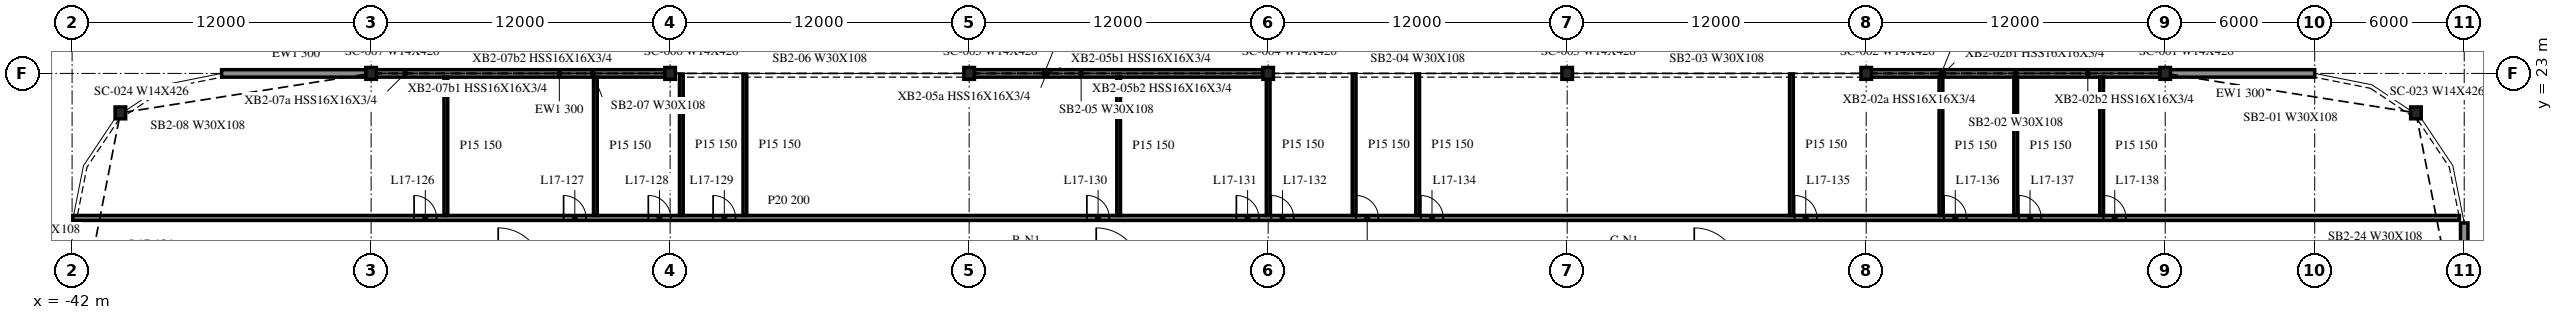
"""IFC4 building model, lengths in metres.
Left out: names, types, materials, properties, quantities, classifications, styles, units other than length and angle.
Written with IfcOpenShell. Run it as: python <this file> out.ifc"""

import sys

from ifc_helpers import new_model, si_unit, direction, frame, frame_2d, origin, origin_2d, place, context, subcontext, project, spatial, rectangle, i_section, extrude, element, fill, save


model = new_model("IFC4")
c1 = context("Model", 3, precision=1e-05, world=origin(), true_north=direction((0.0, 1.0)))
c2 = subcontext(c1, "Body", "Model", "MODEL_VIEW")
j1 = project(units=[si_unit("LENGTHUNIT", "METRE"), si_unit("PLANEANGLEUNIT", "RADIAN")], contexts=[c1])
p1 = place(None, origin())
s1 = spatial("IfcSite", under=j1, at=p1, CompositionType="ELEMENT")
p2 = place(p1, origin())
s2 = spatial("IfcBuilding", under=s1, at=p2, CompositionType="ELEMENT")
p3 = place(p2, frame((0.0, 0.0, 76.1)))
s3 = spatial("IfcBuildingStorey", under=s2, at=p3, CompositionType="ELEMENT", Elevation=76.1)
for number, where, z_axis, x_axis in (
    (1, (52.062, 21.416, -0.34), (0.0, 0.0, 1.0), (1.0, 0.0, 0.0)),
    (2, (42.0, 23.0, -0.34), (0.0, 0.0, 1.0), (1.0, 0.0, 0.0)),
    (3, (30.0, 23.0, -0.34), (0.0, 0.0, 1.0), (1.0, 0.0, 0.0)),
    (4, (18.0, 23.0, -0.34), (0.0, 0.0, 1.0), (1.0, 0.0, 0.0)),
    (5, (6.0, 23.0, -0.34), (0.0, 0.0, 1.0), (1.0, 0.0, 0.0)),
    (6, (-6.0, 23.0, -0.34), (0.0, 0.0, 1.0), (1.0, 0.0, 0.0)),
    (7, (-18.0, 23.0, -0.34), (0.0, 0.0, 1.0), (1.0, 0.0, 0.0)),
    (8, (-30.0, 23.0, -0.34), (0.0, 0.0, 1.0), (1.0, 0.0, 0.0)),
    (9, (-40.062, 21.416, -0.34), (0.0, 0.0, 1.0), (1.0, 0.0, 0.0)),
):
    element("IfcColumn", number, at=place(p3, frame(where, z_axis=z_axis, x_axis=x_axis)), inside=s3, PredefinedType="COLUMN", context=c2, shape_type="SweptSolid", body=[
        extrude(i_section(OverallWidth=0.424, OverallDepth=0.475, WebThickness=0.048, FlangeThickness=0.077, at=origin_2d()), origin(), (0.0, 0.0, 1.0), 4.09),
    ])
p4 = place(p3, frame((48.0, 23.0, 0.0), z_axis=(0.0, 0.0, 1.0), x_axis=(-1.0, 0.0, 0.0)))
e10 = element("IfcWall", 10, at=p4, inside=s3, PredefinedType="NOTDEFINED", context=c2, shape_type="SweptSolid", body=[
    extrude(rectangle(XDim=5.976, YDim=0.3, at=frame_2d((2.988, 0.0))), origin(), (0.0, 0.0, 1.0), 3.75),
])
for number, where, z_axis, x_axis in (
    (11, (41.976, 23.0, 0.0), (0.0, 0.0, 1.0), (-1.0, 0.0, 0.0)),
    (12, (5.976, 23.0, 0.0), (0.0, 0.0, 1.0), (-1.0, 0.0, 0.0)),
    (13, (-18.024, 23.0, 0.0), (0.0, 0.0, 1.0), (-1.0, 0.0, 0.0)),
):
    element("IfcWall", number, at=place(p3, frame(where, z_axis=z_axis, x_axis=x_axis)), inside=s3, PredefinedType="NOTDEFINED", context=c2, shape_type="SweptSolid", body=[
        extrude(rectangle(XDim=11.952, YDim=0.3, at=frame_2d((5.976, 0.0))), origin(), (0.0, 0.0, 1.0), 3.75),
    ])
p5 = place(p3, frame((-30.024, 23.0, 0.0), z_axis=(0.0, 0.0, 1.0), x_axis=(-1.0, 0.0, 0.0)))
e14 = element("IfcWall", 14, at=p5, inside=s3, PredefinedType="NOTDEFINED", context=c2, shape_type="SweptSolid", body=[
    extrude(rectangle(XDim=5.976, YDim=0.3, at=frame_2d((2.988, 0.0))), origin(), (0.0, 0.0, 1.0), 3.75),
])
p6 = place(p3, frame((54.0, 11.738, 0.0), z_axis=(0.0, 0.0, 1.0), x_axis=(0.0, 1.0, 0.0)))
e15 = element("IfcWall", 15, at=p6, inside=s3, PredefinedType="NOTDEFINED", context=c2, shape_type="SweptSolid", body=[
    extrude(rectangle(XDim=5.262, YDim=0.3, at=frame_2d((2.631, 0.0))), origin(), (0.0, 0.0, 1.0), 3.75),
])
p7 = place(p3, frame((-41.975, 17.2, 0.0), z_axis=(0.0, 0.0, 1.0), x_axis=(1.0, 0.0, 0.0)))
e16 = element("IfcWall", 16, at=p7, inside=s3, PredefinedType="PARTITIONING", context=c2, shape_type="SweptSolid", body=[
    extrude(rectangle(XDim=95.782, YDim=0.2, at=frame_2d((47.891, 0.0))), origin(), (0.0, 0.0, 1.0), 3.75),
])
p8 = place(p7, frame((13.7, 0.0, 0.0)))
e17 = element("IfcOpeningElement", 17, at=p8, cuts=e16, PredefinedType="OPENING", context=c2, shape_type="SweptSolid", body=[
    extrude(rectangle(XDim=0.9, YDim=2.1, at=frame_2d((0.45, 1.05))), frame((0.0, 0.11, 0.0), z_axis=(0.0, -1.0, 0.0), x_axis=(1.0, 0.0, 0.0)), (0.0, 0.0, 1.0), 0.22),
])
p9 = place(p7, frame((19.7, 0.0, 0.0)))
e18 = element("IfcOpeningElement", 18, at=p9, cuts=e16, PredefinedType="OPENING", context=c2, shape_type="SweptSolid", body=[
    extrude(rectangle(XDim=0.9, YDim=2.1, at=frame_2d((0.45, 1.05))), frame((0.0, 0.11, 0.0), z_axis=(0.0, -1.0, 0.0), x_axis=(1.0, 0.0, 0.0)), (0.0, 0.0, 1.0), 0.22),
])
p10 = place(p7, frame((23.1, 0.0, 0.0)))
e19 = element("IfcOpeningElement", 19, at=p10, cuts=e16, PredefinedType="OPENING", context=c2, shape_type="SweptSolid", body=[
    extrude(rectangle(XDim=0.9, YDim=2.1, at=frame_2d((0.45, 1.05))), frame((0.0, 0.11, 0.0), z_axis=(0.0, -1.0, 0.0), x_axis=(1.0, 0.0, 0.0)), (0.0, 0.0, 1.0), 0.22),
])
p11 = place(p7, frame((25.7, 0.0, 0.0)))
e20 = element("IfcOpeningElement", 20, at=p11, cuts=e16, PredefinedType="OPENING", context=c2, shape_type="SweptSolid", body=[
    extrude(rectangle(XDim=0.9, YDim=2.1, at=frame_2d((0.45, 1.05))), frame((0.0, 0.11, 0.0), z_axis=(0.0, -1.0, 0.0), x_axis=(1.0, 0.0, 0.0)), (0.0, 0.0, 1.0), 0.22),
])
p12 = place(p7, frame((40.7, 0.0, 0.0)))
e21 = element("IfcOpeningElement", 21, at=p12, cuts=e16, PredefinedType="OPENING", context=c2, shape_type="SweptSolid", body=[
    extrude(rectangle(XDim=0.9, YDim=2.1, at=frame_2d((0.45, 1.05))), frame((0.0, 0.11, 0.0), z_axis=(0.0, -1.0, 0.0), x_axis=(1.0, 0.0, 0.0)), (0.0, 0.0, 1.0), 0.22),
])
p13 = place(p7, frame((46.7, 0.0, 0.0)))
e22 = element("IfcOpeningElement", 22, at=p13, cuts=e16, PredefinedType="OPENING", context=c2, shape_type="SweptSolid", body=[
    extrude(rectangle(XDim=0.9, YDim=2.1, at=frame_2d((0.45, 1.05))), frame((0.0, 0.11, 0.0), z_axis=(0.0, -1.0, 0.0), x_axis=(1.0, 0.0, 0.0)), (0.0, 0.0, 1.0), 0.22),
])
p14 = place(p7, frame((48.1, 0.0, 0.0)))
e23 = element("IfcOpeningElement", 23, at=p14, cuts=e16, PredefinedType="OPENING", context=c2, shape_type="SweptSolid", body=[
    extrude(rectangle(XDim=0.9, YDim=2.1, at=frame_2d((0.45, 1.05))), frame((0.0, 0.11, 0.0), z_axis=(0.0, -1.0, 0.0), x_axis=(1.0, 0.0, 0.0)), (0.0, 0.0, 1.0), 0.22),
])
p15 = place(p7, frame((51.5, 0.0, 0.0)))
e24 = element("IfcOpeningElement", 24, at=p15, cuts=e16, PredefinedType="OPENING", context=c2, shape_type="SweptSolid", body=[
    extrude(rectangle(XDim=0.9, YDim=2.1, at=frame_2d((0.45, 1.05))), frame((0.0, 0.11, 0.0), z_axis=(0.0, -1.0, 0.0), x_axis=(1.0, 0.0, 0.0)), (0.0, 0.0, 1.0), 0.22),
])
p16 = place(p7, frame((54.1, 0.0, 0.0)))
e25 = element("IfcOpeningElement", 25, at=p16, cuts=e16, PredefinedType="OPENING", context=c2, shape_type="SweptSolid", body=[
    extrude(rectangle(XDim=0.9, YDim=2.1, at=frame_2d((0.45, 1.05))), frame((0.0, 0.11, 0.0), z_axis=(0.0, -1.0, 0.0), x_axis=(1.0, 0.0, 0.0)), (0.0, 0.0, 1.0), 0.22),
])
p17 = place(p7, frame((69.1, 0.0, 0.0)))
e26 = element("IfcOpeningElement", 26, at=p17, cuts=e16, PredefinedType="OPENING", context=c2, shape_type="SweptSolid", body=[
    extrude(rectangle(XDim=0.9, YDim=2.1, at=frame_2d((0.45, 1.05))), frame((0.0, 0.11, 0.0), z_axis=(0.0, -1.0, 0.0), x_axis=(1.0, 0.0, 0.0)), (0.0, 0.0, 1.0), 0.22),
])
p18 = place(p7, frame((75.1, 0.0, 0.0)))
e27 = element("IfcOpeningElement", 27, at=p18, cuts=e16, PredefinedType="OPENING", context=c2, shape_type="SweptSolid", body=[
    extrude(rectangle(XDim=0.9, YDim=2.1, at=frame_2d((0.45, 1.05))), frame((0.0, 0.11, 0.0), z_axis=(0.0, -1.0, 0.0), x_axis=(1.0, 0.0, 0.0)), (0.0, 0.0, 1.0), 0.22),
])
p19 = place(p7, frame((78.1, 0.0, 0.0)))
e28 = element("IfcOpeningElement", 28, at=p19, cuts=e16, PredefinedType="OPENING", context=c2, shape_type="SweptSolid", body=[
    extrude(rectangle(XDim=0.9, YDim=2.1, at=frame_2d((0.45, 1.05))), frame((0.0, 0.11, 0.0), z_axis=(0.0, -1.0, 0.0), x_axis=(1.0, 0.0, 0.0)), (0.0, 0.0, 1.0), 0.22),
])
p20 = place(p7, frame((81.5, 0.0, 0.0)))
e29 = element("IfcOpeningElement", 29, at=p20, cuts=e16, PredefinedType="OPENING", context=c2, shape_type="SweptSolid", body=[
    extrude(rectangle(XDim=0.9, YDim=2.1, at=frame_2d((0.45, 1.05))), frame((0.0, 0.11, 0.0), z_axis=(0.0, -1.0, 0.0), x_axis=(1.0, 0.0, 0.0)), (0.0, 0.0, 1.0), 0.22),
])
for number, where, z_axis, x_axis in (
    (30, (-27.0, 17.3, 0.0), (0.0, 0.0, 1.0), (0.0, 1.0, 0.0)),
    (31, (-21.0, 17.3, 0.0), (0.0, 0.0, 1.0), (0.0, 1.0, 0.0)),
):
    element("IfcWall", number, at=place(p3, frame(where, z_axis=z_axis, x_axis=x_axis)), inside=s3, PredefinedType="PARTITIONING", context=c2, shape_type="SweptSolid", body=[
        extrude(rectangle(XDim=5.55, YDim=0.15, at=frame_2d((2.775, 0.0))), origin(), (0.0, 0.0, 1.0), 3.75),
    ])
for number, where, z_axis, x_axis in (
    (32, (-17.55, 17.3, 0.0), (0.0, 0.0, 1.0), (0.0, 1.0, 0.0)),
    (33, (-15.0, 17.3, 0.0), (0.0, 0.0, 1.0), (0.0, 1.0, 0.0)),
):
    element("IfcWall", number, at=place(p3, frame(where, z_axis=z_axis, x_axis=x_axis)), inside=s3, PredefinedType="PARTITIONING", context=c2, shape_type="SweptSolid", body=[
        extrude(rectangle(XDim=5.675, YDim=0.15, at=frame_2d((2.837, 0.0))), origin(), (0.0, 0.0, 1.0), 3.75),
    ])
p21 = place(p3, frame((0.0, 17.3, 0.0), z_axis=(0.0, 0.0, 1.0), x_axis=(0.0, 1.0, 0.0)))
e34 = element("IfcWall", 34, at=p21, inside=s3, PredefinedType="PARTITIONING", context=c2, shape_type="SweptSolid", body=[
    extrude(rectangle(XDim=5.55, YDim=0.15, at=frame_2d((2.775, 0.0))), origin(), (0.0, 0.0, 1.0), 3.75),
])
p22 = place(p3, frame((6.0, 17.3, 0.0), z_axis=(0.0, 0.0, 1.0), x_axis=(0.0, 1.0, 0.0)))
e35 = element("IfcWall", 35, at=p22, inside=s3, PredefinedType="PARTITIONING", context=c2, shape_type="SweptSolid", body=[
    extrude(rectangle(XDim=5.675, YDim=0.15, at=frame_2d((2.837, 0.0))), origin(), (0.0, 0.0, 1.0), 2.751),
])
for number, where, z_axis, x_axis in (
    (36, (9.45, 17.3, 0.0), (0.0, 0.0, 1.0), (0.0, 1.0, 0.0)),
    (37, (12.0, 17.3, 0.0), (0.0, 0.0, 1.0), (0.0, 1.0, 0.0)),
    (38, (27.0, 17.3, 0.0), (0.0, 0.0, 1.0), (0.0, 1.0, 0.0)),
):
    element("IfcWall", number, at=place(p3, frame(where, z_axis=z_axis, x_axis=x_axis)), inside=s3, PredefinedType="PARTITIONING", context=c2, shape_type="SweptSolid", body=[
        extrude(rectangle(XDim=5.675, YDim=0.15, at=frame_2d((2.837, 0.0))), origin(), (0.0, 0.0, 1.0), 3.75),
    ])
for number, where, z_axis, x_axis in (
    (39, (33.0, 17.3, 0.0), (0.0, 0.0, 1.0), (0.0, 1.0, 0.0)),
    (40, (36.0, 17.3, 0.0), (0.0, 0.0, 1.0), (0.0, 1.0, 0.0)),
    (41, (39.45, 17.3, 0.0), (0.0, 0.0, 1.0), (0.0, 1.0, 0.0)),
):
    element("IfcWall", number, at=place(p3, frame(where, z_axis=z_axis, x_axis=x_axis)), inside=s3, PredefinedType="PARTITIONING", context=c2, shape_type="SweptSolid", body=[
        extrude(rectangle(XDim=5.55, YDim=0.15, at=frame_2d((2.775, 0.0))), origin(), (0.0, 0.0, 1.0), 3.75),
    ])
p23 = place(p8, origin())
e42 = element("IfcDoor", 42, at=p23, inside=s3, OperationType="SINGLE_SWING_LEFT", PredefinedType="DOOR", context=c2, shape_type="SweptSolid", body=[
    extrude(rectangle(XDim=0.9, YDim=2.1, at=frame_2d((0.45, 1.05))), frame((0.0, 0.025, 0.0), z_axis=(0.0, -1.0, 0.0), x_axis=(1.0, 0.0, 0.0)), (0.0, 0.0, 1.0), 0.05),
])
fill(e17, e42)
p24 = place(p9, origin())
e43 = element("IfcDoor", 43, at=p24, inside=s3, OperationType="SINGLE_SWING_LEFT", PredefinedType="DOOR", context=c2, shape_type="SweptSolid", body=[
    extrude(rectangle(XDim=0.9, YDim=2.1, at=frame_2d((0.45, 1.05))), frame((0.0, 0.025, 0.0), z_axis=(0.0, -1.0, 0.0), x_axis=(1.0, 0.0, 0.0)), (0.0, 0.0, 1.0), 0.05),
])
fill(e18, e43)
p25 = place(p10, origin())
e44 = element("IfcDoor", 44, at=p25, inside=s3, OperationType="SINGLE_SWING_LEFT", PredefinedType="DOOR", context=c2, shape_type="SweptSolid", body=[
    extrude(rectangle(XDim=0.9, YDim=2.1, at=frame_2d((0.45, 1.05))), frame((0.0, 0.025, 0.0), z_axis=(0.0, -1.0, 0.0), x_axis=(1.0, 0.0, 0.0)), (0.0, 0.0, 1.0), 0.05),
])
fill(e19, e44)
p26 = place(p11, origin())
e45 = element("IfcDoor", 45, at=p26, inside=s3, OperationType="SINGLE_SWING_LEFT", PredefinedType="DOOR", context=c2, shape_type="SweptSolid", body=[
    extrude(rectangle(XDim=0.9, YDim=2.1, at=frame_2d((0.45, 1.05))), frame((0.0, 0.025, 0.0), z_axis=(0.0, -1.0, 0.0), x_axis=(1.0, 0.0, 0.0)), (0.0, 0.0, 1.0), 0.05),
])
fill(e20, e45)
p27 = place(p12, origin())
e46 = element("IfcDoor", 46, at=p27, inside=s3, OperationType="SINGLE_SWING_LEFT", PredefinedType="DOOR", context=c2, shape_type="SweptSolid", body=[
    extrude(rectangle(XDim=0.9, YDim=2.1, at=frame_2d((0.45, 1.05))), frame((0.0, 0.025, 0.0), z_axis=(0.0, -1.0, 0.0), x_axis=(1.0, 0.0, 0.0)), (0.0, 0.0, 1.0), 0.05),
])
fill(e21, e46)
p28 = place(p13, origin())
e47 = element("IfcDoor", 47, at=p28, inside=s3, OperationType="SINGLE_SWING_LEFT", PredefinedType="DOOR", context=c2, shape_type="SweptSolid", body=[
    extrude(rectangle(XDim=0.9, YDim=2.1, at=frame_2d((0.45, 1.05))), frame((0.0, 0.025, 0.0), z_axis=(0.0, -1.0, 0.0), x_axis=(1.0, 0.0, 0.0)), (0.0, 0.0, 1.0), 0.05),
])
fill(e22, e47)
p29 = place(p14, origin())
e48 = element("IfcDoor", 48, at=p29, inside=s3, OperationType="SINGLE_SWING_RIGHT", PredefinedType="DOOR", context=c2, shape_type="SweptSolid", body=[
    extrude(rectangle(XDim=0.9, YDim=2.1, at=frame_2d((0.45, 1.05))), frame((0.0, 0.025, 0.0), z_axis=(0.0, -1.0, 0.0), x_axis=(1.0, 0.0, 0.0)), (0.0, 0.0, 1.0), 0.05),
])
fill(e23, e48)
p30 = place(p15, origin())
e49 = element("IfcDoor", 49, at=p30, inside=s3, OperationType="SINGLE_SWING_RIGHT", PredefinedType="DOOR", context=c2, shape_type="SweptSolid", body=[
    extrude(rectangle(XDim=0.9, YDim=2.1, at=frame_2d((0.45, 1.05))), frame((0.0, 0.025, 0.0), z_axis=(0.0, -1.0, 0.0), x_axis=(1.0, 0.0, 0.0)), (0.0, 0.0, 1.0), 0.05),
])
fill(e24, e49)
p31 = place(p16, origin())
e50 = element("IfcDoor", 50, at=p31, inside=s3, OperationType="SINGLE_SWING_RIGHT", PredefinedType="DOOR", context=c2, shape_type="SweptSolid", body=[
    extrude(rectangle(XDim=0.9, YDim=2.1, at=frame_2d((0.45, 1.05))), frame((0.0, 0.025, 0.0), z_axis=(0.0, -1.0, 0.0), x_axis=(1.0, 0.0, 0.0)), (0.0, 0.0, 1.0), 0.05),
])
fill(e25, e50)
p32 = place(p17, origin())
e51 = element("IfcDoor", 51, at=p32, inside=s3, OperationType="SINGLE_SWING_RIGHT", PredefinedType="DOOR", context=c2, shape_type="SweptSolid", body=[
    extrude(rectangle(XDim=0.9, YDim=2.1, at=frame_2d((0.45, 1.05))), frame((0.0, 0.025, 0.0), z_axis=(0.0, -1.0, 0.0), x_axis=(1.0, 0.0, 0.0)), (0.0, 0.0, 1.0), 0.05),
])
fill(e26, e51)
p33 = place(p18, origin())
e52 = element("IfcDoor", 52, at=p33, inside=s3, OperationType="SINGLE_SWING_RIGHT", PredefinedType="DOOR", context=c2, shape_type="SweptSolid", body=[
    extrude(rectangle(XDim=0.9, YDim=2.1, at=frame_2d((0.45, 1.05))), frame((0.0, 0.025, 0.0), z_axis=(0.0, -1.0, 0.0), x_axis=(1.0, 0.0, 0.0)), (0.0, 0.0, 1.0), 0.05),
])
fill(e27, e52)
p34 = place(p19, origin())
e53 = element("IfcDoor", 53, at=p34, inside=s3, OperationType="SINGLE_SWING_RIGHT", PredefinedType="DOOR", context=c2, shape_type="SweptSolid", body=[
    extrude(rectangle(XDim=0.9, YDim=2.1, at=frame_2d((0.45, 1.05))), frame((0.0, 0.025, 0.0), z_axis=(0.0, -1.0, 0.0), x_axis=(1.0, 0.0, 0.0)), (0.0, 0.0, 1.0), 0.05),
])
fill(e28, e53)
p35 = place(p20, origin())
e54 = element("IfcDoor", 54, at=p35, inside=s3, OperationType="SINGLE_SWING_RIGHT", PredefinedType="DOOR", context=c2, shape_type="SweptSolid", body=[
    extrude(rectangle(XDim=0.9, YDim=2.1, at=frame_2d((0.45, 1.05))), frame((0.0, 0.025, 0.0), z_axis=(0.0, -1.0, 0.0), x_axis=(1.0, 0.0, 0.0)), (0.0, 0.0, 1.0), 0.05),
])
fill(e29, e54)
save(model, sys.argv[1])
